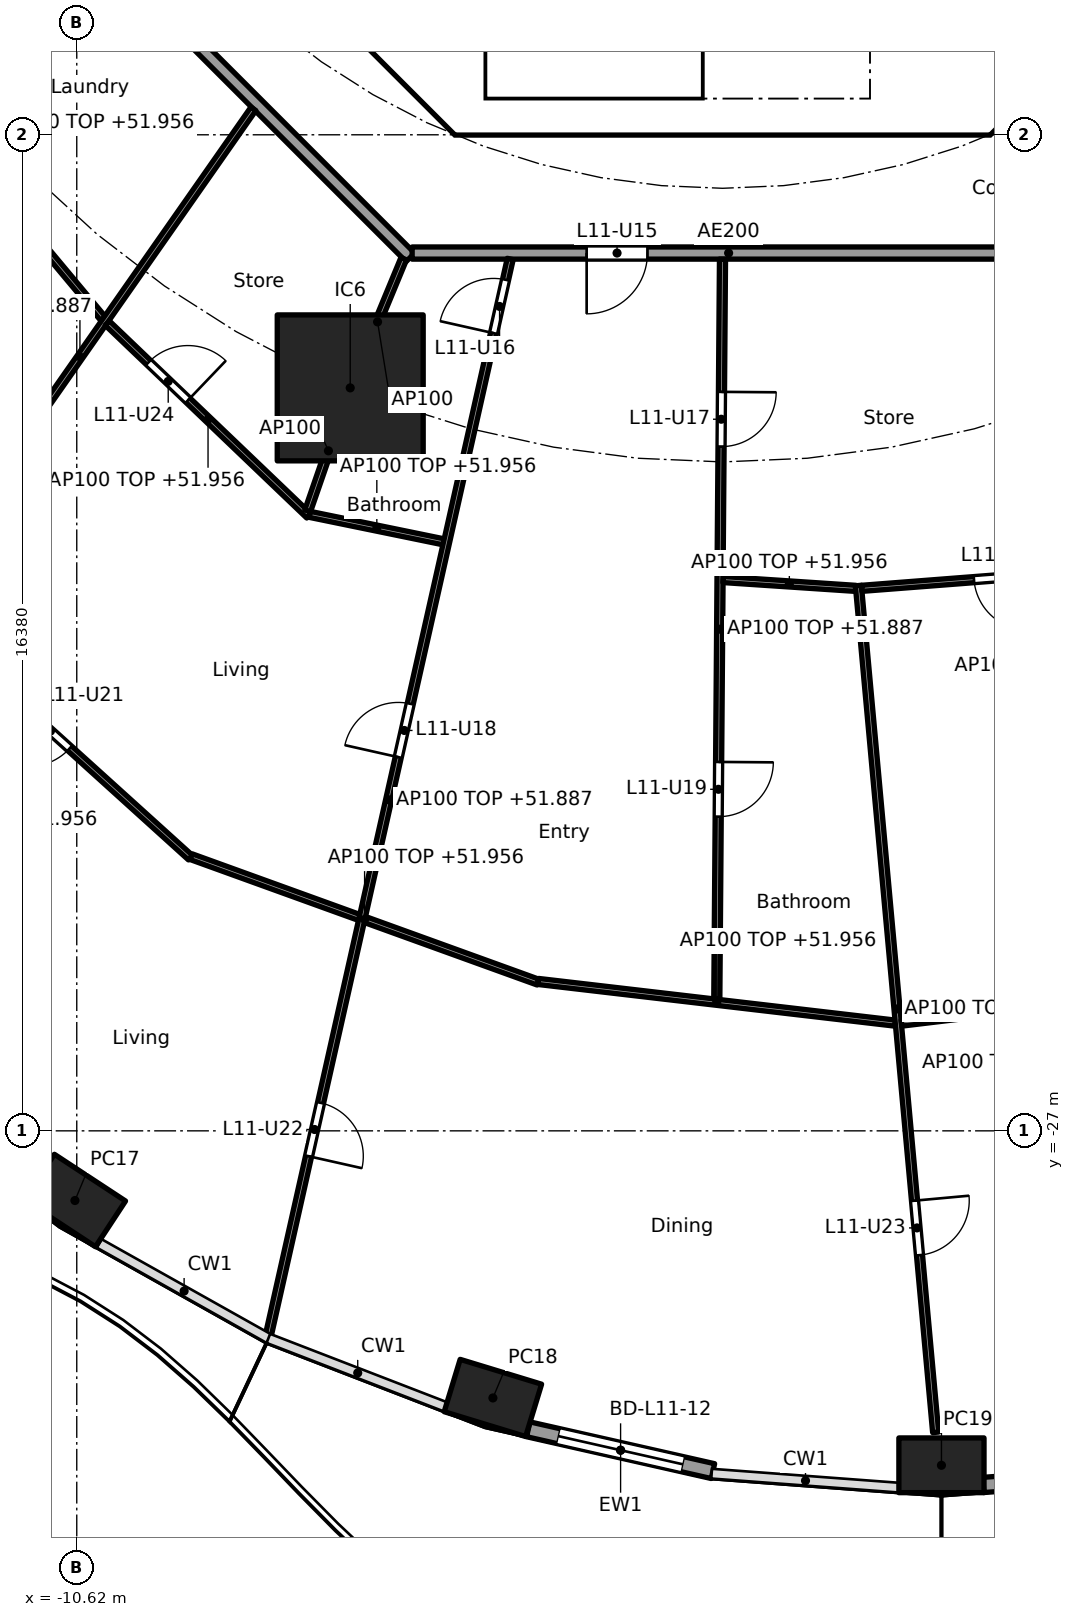
"""IFC4 building model, lengths in metres.
Left out: names, types, materials, properties, quantities, classifications, styles, units other than length and angle.
Written with IfcOpenShell. Run it as: python <this file> out.ifc"""

import sys

from ifc_helpers import new_model, si_unit, direction, frame, frame_2d, origin, origin_2d, place, context, subcontext, project, spatial, polyline, rectangle, hollow_rectangle, outline, extrude, element, fill, save


model = new_model("IFC4")
c1 = context("Model", 3, precision=1e-05, world=origin(), true_north=direction((0.0, 1.0)))
c2 = subcontext(c1, "Body", "Model", "MODEL_VIEW")
j1 = project(units=[si_unit("LENGTHUNIT", "METRE"), si_unit("PLANEANGLEUNIT", "RADIAN")], contexts=[c1])
p1 = place(None, origin())
s1 = spatial("IfcSite", under=j1, at=p1, CompositionType="ELEMENT")
p2 = place(p1, origin())
s2 = spatial("IfcBuilding", under=s1, at=p2, CompositionType="ELEMENT")
p3 = place(p2, frame((0.0, 0.0, 49.2)))
s3 = spatial("IfcBuildingStorey", under=s2, at=p3, CompositionType="ELEMENT", Elevation=49.2)
for number, where, z_axis, x_axis in (
    (1, (-10.65, -28.146, 0.0), (0.0, 0.0, 1.0), (0.836, -0.549, 0.0)),
    (2, (-3.776, -31.393, 0.0), (0.0, 0.0, 1.0), (0.957, -0.292, 0.0)),
    (3, (3.6, -32.5, 0.0), (0.0, 0.0, 1.0), (1.0, 0.0, 0.0)),
):
    element("IfcColumn", number, at=place(p3, frame(where, z_axis=z_axis, x_axis=x_axis)), inside=s3, PredefinedType="COLUMN", context=c2, shape_type="SweptSolid", body=[
        extrude(hollow_rectangle(XDim=1.4, YDim=0.9, WallThickness=0.05, at=origin_2d()), origin(), (0.0, 0.0, 1.0), 3.7),
    ])
p4 = place(p3, frame((-6.123, -14.782, 0.0), z_axis=(0.0, 0.0, 1.0), x_axis=(1.0, 0.0, 0.0)))
e4 = element("IfcColumn", 4, at=p4, inside=s3, PredefinedType="COLUMN", context=c2, shape_type="SweptSolid", body=[
    extrude(rectangle(XDim=2.4, YDim=2.4, at=origin_2d()), origin(), (0.0, 0.0, 1.0), 3.7),
])
p5 = place(p3, frame((-0.158, -32.596, 0.0), z_axis=(0.0, 0.0, 1.0), x_axis=(-0.975331134677, 0.220746863466, 0.0)))
e5 = element("IfcWall", 5, at=p5, inside=s3, PredefinedType="SOLIDWALL", context=c2, shape_type="SweptSolid", body=[
    extrude(rectangle(XDim=3.115, YDim=0.25, at=frame_2d((1.557, 0.0))), origin(), (0.0, 0.0, 1.0), 3.44),
])
p6 = place(p5, frame((0.507, 0.0, 0.0)))
e6 = element("IfcOpeningElement", 6, at=p6, cuts=e5, PredefinedType="OPENING", context=c2, shape_type="SweptSolid", body=[
    extrude(rectangle(XDim=2.1, YDim=2.4, at=frame_2d((1.05, 1.2))), frame((0.0, 0.135, 0.0), z_axis=(0.0, -1.0, 0.0), x_axis=(1.0, 0.0, 0.0)), (0.0, 0.0, 1.0), 0.27),
])
p7 = place(p3, frame((7.376, -32.593, 0.0), z_axis=(0.0, 0.0, 1.0), x_axis=(-0.997230834878, -0.074368420505, 0.0)))
e7 = element("IfcWall", 7, at=p7, inside=s3, PredefinedType="SOLIDWALL", context=c2, shape_type="SweptSolid", body=[
    extrude(rectangle(XDim=3.096, YDim=0.25, at=frame_2d((1.548, 0.0))), origin(), (0.0, 0.0, 1.0), 3.44),
])
p8 = place(p7, frame((0.498, 0.0, 0.0)))
e8 = element("IfcOpeningElement", 8, at=p8, cuts=e7, PredefinedType="OPENING", context=c2, shape_type="SweptSolid", body=[
    extrude(rectangle(XDim=2.1, YDim=2.4, at=frame_2d((1.05, 1.2))), frame((0.0, 0.135, 0.0), z_axis=(0.0, -1.0, 0.0), x_axis=(1.0, 0.0, 0.0)), (0.0, 0.0, 1.0), 0.27),
])
p9 = place(p3, frame((-9.988, -4.613, 0.0), z_axis=(0.0, 0.0, 1.0), x_axis=(0.707106781187, -0.707106781187, 0.0)))
e9 = element("IfcWall", 9, at=p9, inside=s3, PredefinedType="SHEAR", context=c2, shape_type="SweptSolid", body=[
    extrude(rectangle(XDim=7.602, YDim=0.6, at=frame_2d((3.801, 0.0))), origin(), (0.0, 0.0, 1.0), 3.44),
])
p10 = place(p9, frame((6.151, 0.0, 0.0)))
e10 = element("IfcOpeningElement", 10, at=p10, cuts=e9, PredefinedType="OPENING", context=c2, shape_type="SweptSolid", body=[
    extrude(rectangle(XDim=1.1, YDim=2.1, at=frame_2d((0.55, 1.05))), frame((0.0, 0.31, 0.0), z_axis=(0.0, -1.0, 0.0), x_axis=(1.0, 0.0, 0.0)), (0.0, 0.0, 1.0), 0.62),
])
p11 = place(p3, frame((4.613, -9.988, 0.0), z_axis=(0.0, 0.0, 1.0), x_axis=(0.707106781187, 0.707106781187, 0.0)))
e11 = element("IfcWall", 11, at=p11, inside=s3, PredefinedType="SHEAR", context=c2, shape_type="SweptSolid", body=[
    extrude(rectangle(XDim=7.602, YDim=0.6, at=frame_2d((3.801, 0.0))), origin(), (0.0, 0.0, 1.0), 3.44),
])
p12 = place(p11, frame((3.201, 0.0, 0.0)))
e12 = element("IfcOpeningElement", 12, at=p12, cuts=e11, PredefinedType="OPENING", context=c2, shape_type="SweptSolid", body=[
    extrude(rectangle(XDim=1.2, YDim=2.1, at=frame_2d((0.6, 1.05))), frame((0.0, 0.31, 0.0), z_axis=(0.0, -1.0, 0.0), x_axis=(1.0, 0.0, 0.0)), (0.0, 0.0, 1.0), 0.62),
])
p13 = place(p3, frame((4.0, -10.025, 0.0), z_axis=(0.0, 0.0, 1.0), x_axis=(0.0, 1.0, 0.0)))
e13 = element("IfcWall", 13, at=p13, inside=s3, PredefinedType="SOLIDWALL", context=c2, shape_type="SweptSolid", body=[
    extrude(rectangle(XDim=3.0, YDim=0.2, at=frame_2d((1.5, 0.0))), origin(), (0.0, 0.0, 1.0), 3.44),
])
p14 = place(p13, frame((0.975, 0.0, 0.0)))
e14 = element("IfcOpeningElement", 14, at=p14, cuts=e13, PredefinedType="OPENING", context=c2, shape_type="SweptSolid", body=[
    extrude(rectangle(XDim=1.1, YDim=2.1, at=frame_2d((0.55, 1.05))), frame((0.0, 0.11, 0.0), z_axis=(0.0, -1.0, 0.0), x_axis=(1.0, 0.0, 0.0)), (0.0, 0.0, 1.0), 0.22),
])
p15 = place(p3, origin())
e15 = element("IfcWall", 15, at=p15, inside=s3, PredefinedType="SHEAR", context=c2, shape_type="SweptSolid", body=[
    extrude(outline(polyline([(-4.152, -10.025), (4.152, -10.025), (4.401, -9.776), (4.825, -10.2), (4.401, -10.625), (-4.401, -10.625), (-4.825, -10.2), (-4.401, -9.776), (-4.152, -10.025)])), origin(), (0.0, 0.0, 1.0), 3.44),
])
p16 = place(p3, origin())
e16 = element("IfcWall", 16, at=p16, inside=s3, PredefinedType="SOLIDWALL", context=c2, shape_type="SweptSolid", body=[
    extrude(outline(polyline([(-3.9, -10.025), (-4.1, -10.025), (-4.1, -7.025), (-3.9, -7.025), (-3.9, -10.025)])), origin(), (0.0, 0.0, 1.0), 3.44),
])
p17 = place(p3, frame((-12.635, -5.134, 0.0), z_axis=(0.0, 0.0, 1.0), x_axis=(0.707106781187, -0.707106781187, 0.0)))
e17 = element("IfcWall", 17, at=p17, inside=s3, PredefinedType="PARTITIONING", context=c2, shape_type="SweptSolid", body=[
    extrude(rectangle(XDim=10.609, YDim=0.2, at=frame_2d((5.305, 0.0))), origin(), (0.0, 0.0, 1.0), 3.44),
])
p18 = place(p3, frame((-5.104, -12.565, 0.0), z_axis=(0.0, 0.0, 1.0), x_axis=(1.0, 0.0, 0.0)))
e18 = element("IfcWall", 18, at=p18, inside=s3, PredefinedType="PARTITIONING", context=c2, shape_type="SweptSolid", body=[
    extrude(rectangle(XDim=10.409, YDim=0.2, at=frame_2d((5.205, 0.0))), origin(), (0.0, 0.0, 1.0), 3.44),
])
p19 = place(p18, frame((2.87, 0.0, 0.0)))
e19 = element("IfcOpeningElement", 19, at=p19, cuts=e18, PredefinedType="OPENING", context=c2, shape_type="SweptSolid", body=[
    extrude(rectangle(XDim=1.0, YDim=2.1, at=frame_2d((0.5, 1.05))), frame((0.0, 0.11, 0.0), z_axis=(0.0, -1.0, 0.0), x_axis=(1.0, 0.0, 0.0)), (0.0, 0.0, 1.0), 0.22),
])
p20 = place(p3, frame((-13.222, -10.007, 0.0), z_axis=(0.0, 0.0, 1.0), x_axis=(0.640807748916, -0.767701393075, 0.0)))
e20 = element("IfcWall", 20, at=p20, inside=s3, PredefinedType="PARTITIONING", context=c2, shape_type="SweptSolid", body=[
    extrude(rectangle(XDim=4.737, YDim=0.1, at=frame_2d((2.368, 0.0))), origin(), (0.0, 0.0, 1.0), 2.756),
])
p21 = place(p20, frame((1.943, 0.0, 0.0)))
e21 = element("IfcOpeningElement", 21, at=p21, cuts=e20, PredefinedType="OPENING", context=c2, shape_type="SweptSolid", body=[
    extrude(rectangle(XDim=0.9, YDim=2.1, at=frame_2d((0.45, 1.05))), frame((0.0, 0.06, 0.0), z_axis=(0.0, -1.0, 0.0), x_axis=(1.0, 0.0, 0.0)), (0.0, 0.0, 1.0), 0.12),
])
p22 = place(p3, frame((-7.715, -10.193, 0.0), z_axis=(0.0, 0.0, 1.0), x_axis=(-0.573126502256, -0.819466907454, 0.0)))
e22 = element("IfcWall", 22, at=p22, inside=s3, PredefinedType="PARTITIONING", context=c2, shape_type="SweptSolid", body=[
    extrude(rectangle(XDim=9.954, YDim=0.1, at=frame_2d((4.977, 0.0))), origin(), (0.0, 0.0, 1.0), 2.687),
])
p23 = place(p3, frame((-10.119, -13.716, 0.0), z_axis=(0.0, 0.0, 1.0), x_axis=(0.722763212502, -0.69109575216, 0.0)))
e23 = element("IfcWall", 23, at=p23, inside=s3, PredefinedType="PARTITIONING", context=c2, shape_type="SweptSolid", body=[
    extrude(rectangle(XDim=4.587, YDim=0.1, at=frame_2d((2.293, 0.0))), origin(), (0.0, 0.0, 1.0), 2.756),
])
p24 = place(p23, frame((0.938, 0.0, 0.0)))
e24 = element("IfcOpeningElement", 24, at=p24, cuts=e23, PredefinedType="OPENING", context=c2, shape_type="SweptSolid", body=[
    extrude(rectangle(XDim=0.9, YDim=2.1, at=frame_2d((0.45, 1.05))), frame((0.0, 0.06, 0.0), z_axis=(0.0, -1.0, 0.0), x_axis=(1.0, 0.0, 0.0)), (0.0, 0.0, 1.0), 0.12),
])
p25 = place(p3, frame((-13.355, -18.343, 0.0), z_axis=(0.0, 0.0, 1.0), x_axis=(0.741720189244, -0.670709445936, 0.0)))
e25 = element("IfcWall", 25, at=p25, inside=s3, PredefinedType="PARTITIONING", context=c2, shape_type="SweptSolid", body=[
    extrude(rectangle(XDim=6.209, YDim=0.1, at=frame_2d((3.104, 0.0))), origin(), (0.0, 0.0, 1.0), 2.756),
])
p26 = place(p25, frame((2.63, 0.0, 0.0)))
e26 = element("IfcOpeningElement", 26, at=p26, cuts=e25, PredefinedType="OPENING", context=c2, shape_type="SweptSolid", body=[
    extrude(rectangle(XDim=0.9, YDim=2.1, at=frame_2d((0.45, 1.05))), frame((0.0, 0.06, 0.0), z_axis=(0.0, -1.0, 0.0), x_axis=(1.0, 0.0, 0.0)), (0.0, 0.0, 1.0), 0.12),
])
p27 = place(p3, frame((-5.243, -12.657, 0.0), z_axis=(0.0, 0.0, 1.0), x_axis=(-0.382719158442, -0.923864733477, 0.0)))
e27 = element("IfcWall", 27, at=p27, inside=s3, PredefinedType="PARTITIONING", context=c2, shape_type="SweptSolid", body=[
    extrude(rectangle(XDim=2.25, YDim=0.1, at=frame_2d((1.125, 0.0))), origin(), (0.0, 0.0, 1.0), 3.44),
])
p28 = place(p3, frame((-6.139, -14.83, 0.0), z_axis=(0.0, 0.0, 1.0), x_axis=(-0.327246993321, -0.944938836837, 0.0)))
e28 = element("IfcWall", 28, at=p28, inside=s3, PredefinedType="PARTITIONING", context=c2, shape_type="SweptSolid", body=[
    extrude(rectangle(XDim=2.09, YDim=0.1, at=frame_2d((1.045, 0.0))), origin(), (0.0, 0.0, 1.0), 3.44),
])
p29 = place(p3, frame((-6.791, -16.862, 0.0), z_axis=(0.0, 0.0, 1.0), x_axis=(0.979581941859, -0.201045316246, 0.0)))
e29 = element("IfcWall", 29, at=p29, inside=s3, PredefinedType="PARTITIONING", context=c2, shape_type="SweptSolid", body=[
    extrude(rectangle(XDim=2.256, YDim=0.1, at=frame_2d((1.128, 0.0))), origin(), (0.0, 0.0, 1.0), 2.756),
])
p30 = place(p3, frame((-8.739, -22.491, 0.0), z_axis=(0.0, 0.0, 1.0), x_axis=(0.940401691072, -0.340065669288, 0.0)))
e30 = element("IfcWall", 30, at=p30, inside=s3, PredefinedType="PARTITIONING", context=c2, shape_type="SweptSolid", body=[
    extrude(rectangle(XDim=6.067, YDim=0.1, at=frame_2d((3.034, 0.0))), origin(), (0.0, 0.0, 1.0), 2.756),
])
p31 = place(p3, frame((-3.492, -12.662, 0.0), z_axis=(0.0, 0.0, 1.0), x_axis=(-0.219268088006, -0.975664648115, 0.0)))
e31 = element("IfcWall", 31, at=p31, inside=s3, PredefinedType="PARTITIONING", context=c2, shape_type="SweptSolid", body=[
    extrude(rectangle(XDim=18.23, YDim=0.1, at=frame_2d((9.115, 0.0))), origin(), (0.0, 0.0, 1.0), 2.687),
])
p32 = place(p31, frame((0.35, 0.0, 0.0)))
e32 = element("IfcOpeningElement", 32, at=p32, cuts=e31, PredefinedType="OPENING", context=c2, shape_type="SweptSolid", body=[
    extrude(rectangle(XDim=0.9, YDim=2.1, at=frame_2d((0.45, 1.05))), frame((0.0, 0.06, 0.0), z_axis=(0.0, -1.0, 0.0), x_axis=(1.0, 0.0, 0.0)), (0.0, 0.0, 1.0), 0.12),
])
p33 = place(p31, frame((7.497, 0.0, 0.0)))
e33 = element("IfcOpeningElement", 33, at=p33, cuts=e31, PredefinedType="OPENING", context=c2, shape_type="SweptSolid", body=[
    extrude(rectangle(XDim=0.9, YDim=2.1, at=frame_2d((0.45, 1.05))), frame((0.0, 0.06, 0.0), z_axis=(0.0, -1.0, 0.0), x_axis=(1.0, 0.0, 0.0)), (0.0, 0.0, 1.0), 0.12),
])
p34 = place(p31, frame((14.223, 0.0, 0.0)))
e34 = element("IfcOpeningElement", 34, at=p34, cuts=e31, PredefinedType="OPENING", context=c2, shape_type="SweptSolid", body=[
    extrude(rectangle(XDim=0.9, YDim=2.1, at=frame_2d((0.45, 1.05))), frame((0.0, 0.06, 0.0), z_axis=(0.0, -1.0, 0.0), x_axis=(1.0, 0.0, 0.0)), (0.0, 0.0, 1.0), 0.12),
])
p35 = place(p3, frame((-3.031, -24.543, 0.0), z_axis=(0.0, 0.0, 1.0), x_axis=(0.993255612046, -0.115945198862, 0.0)))
e35 = element("IfcWall", 35, at=p35, inside=s3, PredefinedType="PARTITIONING", context=c2, shape_type="SweptSolid", body=[
    extrude(rectangle(XDim=5.913, YDim=0.1, at=frame_2d((2.956, 0.0))), origin(), (0.0, 0.0, 1.0), 2.756),
])
p36 = place(p3, frame((-0.001, -12.665, 0.0), z_axis=(0.0, 0.0, 1.0), x_axis=(-0.007702417287, -0.999970335944, 0.0)))
e36 = element("IfcWall", 36, at=p36, inside=s3, PredefinedType="PARTITIONING", context=c2, shape_type="SweptSolid", body=[
    extrude(rectangle(XDim=12.171, YDim=0.1, at=frame_2d((6.086, 0.0))), origin(), (0.0, 0.0, 1.0), 2.687),
])
p37 = place(p36, frame((2.183, 0.0, 0.0)))
e37 = element("IfcOpeningElement", 37, at=p37, cuts=e36, PredefinedType="OPENING", context=c2, shape_type="SweptSolid", body=[
    extrude(rectangle(XDim=0.9, YDim=2.1, at=frame_2d((0.45, 1.05))), frame((0.0, 0.06, 0.0), z_axis=(0.0, -1.0, 0.0), x_axis=(1.0, 0.0, 0.0)), (0.0, 0.0, 1.0), 0.12),
])
p38 = place(p36, frame((8.269, 0.0, 0.0)))
e38 = element("IfcOpeningElement", 38, at=p38, cuts=e36, PredefinedType="OPENING", context=c2, shape_type="SweptSolid", body=[
    extrude(rectangle(XDim=0.9, YDim=2.1, at=frame_2d((0.45, 1.05))), frame((0.0, 0.06, 0.0), z_axis=(0.0, -1.0, 0.0), x_axis=(1.0, 0.0, 0.0)), (0.0, 0.0, 1.0), 0.12),
])
p39 = place(p3, frame((0.009, -17.934, 0.0), z_axis=(0.0, 0.0, 1.0), x_axis=(0.997794542617, -0.066378089183, 0.0)))
e39 = element("IfcWall", 39, at=p39, inside=s3, PredefinedType="PARTITIONING", context=c2, shape_type="SweptSolid", body=[
    extrude(rectangle(XDim=2.185, YDim=0.1, at=frame_2d((1.092, 0.0))), origin(), (0.0, 0.0, 1.0), 2.756),
])
p40 = place(p3, frame((2.234, -18.032, 0.0), z_axis=(0.0, 0.0, 1.0), x_axis=(0.090891502968, -0.995860800859, 0.0)))
e40 = element("IfcWall", 40, at=p40, inside=s3, PredefinedType="PARTITIONING", context=c2, shape_type="SweptSolid", body=[
    extrude(rectangle(XDim=13.984, YDim=0.1, at=frame_2d((6.992, 0.0))), origin(), (0.0, 0.0, 1.0), 2.756),
])
p41 = place(p40, frame((10.158, 0.0, 0.0)))
e41 = element("IfcOpeningElement", 41, at=p41, cuts=e40, PredefinedType="OPENING", context=c2, shape_type="SweptSolid", body=[
    extrude(rectangle(XDim=0.9, YDim=2.1, at=frame_2d((0.45, 1.05))), frame((0.0, 0.06, 0.0), z_axis=(0.0, -1.0, 0.0), x_axis=(1.0, 0.0, 0.0)), (0.0, 0.0, 1.0), 0.12),
])
p42 = place(p3, frame((2.288, -18.078, 0.0), z_axis=(0.0, 0.0, 1.0), x_axis=(0.99701850123, 0.077162868047, 0.0)))
e42 = element("IfcWall", 42, at=p42, inside=s3, PredefinedType="PARTITIONING", context=c2, shape_type="SweptSolid", body=[
    extrude(rectangle(XDim=4.604, YDim=0.1, at=frame_2d((2.302, 0.0))), origin(), (0.0, 0.0, 1.0), 2.756),
])
p43 = place(p42, frame((1.852, 0.0, 0.0)))
e43 = element("IfcOpeningElement", 43, at=p43, cuts=e42, PredefinedType="OPENING", context=c2, shape_type="SweptSolid", body=[
    extrude(rectangle(XDim=0.9, YDim=2.1, at=frame_2d((0.45, 1.05))), frame((0.0, 0.06, 0.0), z_axis=(0.0, -1.0, 0.0), x_axis=(1.0, 0.0, 0.0)), (0.0, 0.0, 1.0), 0.12),
])
p44 = place(p3, frame((2.941, -25.229, 0.0), z_axis=(0.0, 0.0, 1.0), x_axis=(0.992834127896, 0.119500604542, 0.0)))
e44 = element("IfcWall", 44, at=p44, inside=s3, PredefinedType="PARTITIONING", context=c2, shape_type="SweptSolid", body=[
    extrude(rectangle(XDim=5.959, YDim=0.1, at=frame_2d((2.98, 0.0))), origin(), (0.0, 0.0, 1.0), 2.756),
])
p45 = place(p6, origin())
e45 = element("IfcDoor", 45, at=p45, inside=s3, OperationType="SLIDING_TO_LEFT", PredefinedType="DOOR", context=c2, shape_type="SweptSolid", body=[
    extrude(rectangle(XDim=2.1, YDim=2.4, at=frame_2d((1.05, 1.2))), frame((0.0, 0.025, 0.0), z_axis=(0.0, -1.0, 0.0), x_axis=(1.0, 0.0, 0.0)), (0.0, 0.0, 1.0), 0.05),
])
fill(e6, e45)
p46 = place(p10, origin())
e46 = element("IfcDoor", 46, at=p46, inside=s3, OperationType="SINGLE_SWING_RIGHT", PredefinedType="DOOR", context=c2, shape_type="SweptSolid", body=[
    extrude(rectangle(XDim=1.1, YDim=2.1, at=frame_2d((0.55, 1.05))), frame((0.0, 0.025, 0.0), z_axis=(0.0, -1.0, 0.0), x_axis=(1.0, 0.0, 0.0)), (0.0, 0.0, 1.0), 0.05),
])
fill(e10, e46)
p47 = place(p19, frame((1.0, 0.0, 0.0), x_axis=(-1.0, 0.0, 0.0)))
e47 = element("IfcDoor", 47, at=p47, inside=s3, OperationType="SINGLE_SWING_RIGHT", PredefinedType="DOOR", context=c2, shape_type="SweptSolid", body=[
    extrude(rectangle(XDim=1.0, YDim=2.1, at=frame_2d((0.5, 1.05))), frame((0.0, 0.025, 0.0), z_axis=(0.0, -1.0, 0.0), x_axis=(1.0, 0.0, 0.0)), (0.0, 0.0, 1.0), 0.05),
])
fill(e19, e47)
p48 = place(p32, frame((0.9, 0.0, 0.0), x_axis=(-1.0, 0.0, 0.0)))
e48 = element("IfcDoor", 48, at=p48, inside=s3, OperationType="SINGLE_SWING_LEFT", PredefinedType="DOOR", context=c2, shape_type="SweptSolid", body=[
    extrude(rectangle(XDim=0.9, YDim=2.1, at=frame_2d((0.45, 1.05))), frame((0.0, 0.025, 0.0), z_axis=(0.0, -1.0, 0.0), x_axis=(1.0, 0.0, 0.0)), (0.0, 0.0, 1.0), 0.05),
])
fill(e32, e48)
p49 = place(p37, origin())
e49 = element("IfcDoor", 49, at=p49, inside=s3, OperationType="SINGLE_SWING_LEFT", PredefinedType="DOOR", context=c2, shape_type="SweptSolid", body=[
    extrude(rectangle(XDim=0.9, YDim=2.1, at=frame_2d((0.45, 1.05))), frame((0.0, 0.025, 0.0), z_axis=(0.0, -1.0, 0.0), x_axis=(1.0, 0.0, 0.0)), (0.0, 0.0, 1.0), 0.05),
])
fill(e37, e49)
p50 = place(p33, frame((0.9, 0.0, 0.0), x_axis=(-1.0, 0.0, 0.0)))
e50 = element("IfcDoor", 50, at=p50, inside=s3, OperationType="SINGLE_SWING_LEFT", PredefinedType="DOOR", context=c2, shape_type="SweptSolid", body=[
    extrude(rectangle(XDim=0.9, YDim=2.1, at=frame_2d((0.45, 1.05))), frame((0.0, 0.025, 0.0), z_axis=(0.0, -1.0, 0.0), x_axis=(1.0, 0.0, 0.0)), (0.0, 0.0, 1.0), 0.05),
])
fill(e33, e50)
p51 = place(p38, origin())
e51 = element("IfcDoor", 51, at=p51, inside=s3, OperationType="SINGLE_SWING_LEFT", PredefinedType="DOOR", context=c2, shape_type="SweptSolid", body=[
    extrude(rectangle(XDim=0.9, YDim=2.1, at=frame_2d((0.45, 1.05))), frame((0.0, 0.025, 0.0), z_axis=(0.0, -1.0, 0.0), x_axis=(1.0, 0.0, 0.0)), (0.0, 0.0, 1.0), 0.05),
])
fill(e38, e51)
p52 = place(p43, frame((0.9, 0.0, 0.0), x_axis=(-1.0, 0.0, 0.0)))
e52 = element("IfcDoor", 52, at=p52, inside=s3, OperationType="SINGLE_SWING_LEFT", PredefinedType="DOOR", context=c2, shape_type="SweptSolid", body=[
    extrude(rectangle(XDim=0.9, YDim=2.1, at=frame_2d((0.45, 1.05))), frame((0.0, 0.025, 0.0), z_axis=(0.0, -1.0, 0.0), x_axis=(1.0, 0.0, 0.0)), (0.0, 0.0, 1.0), 0.05),
])
fill(e43, e52)
p53 = place(p26, frame((0.9, 0.0, 0.0), x_axis=(-1.0, 0.0, 0.0)))
e53 = element("IfcDoor", 53, at=p53, inside=s3, OperationType="SINGLE_SWING_RIGHT", PredefinedType="DOOR", context=c2, shape_type="SweptSolid", body=[
    extrude(rectangle(XDim=0.9, YDim=2.1, at=frame_2d((0.45, 1.05))), frame((0.0, 0.025, 0.0), z_axis=(0.0, -1.0, 0.0), x_axis=(1.0, 0.0, 0.0)), (0.0, 0.0, 1.0), 0.05),
])
fill(e26, e53)
p54 = place(p34, origin())
e54 = element("IfcDoor", 54, at=p54, inside=s3, OperationType="SINGLE_SWING_RIGHT", PredefinedType="DOOR", context=c2, shape_type="SweptSolid", body=[
    extrude(rectangle(XDim=0.9, YDim=2.1, at=frame_2d((0.45, 1.05))), frame((0.0, 0.025, 0.0), z_axis=(0.0, -1.0, 0.0), x_axis=(1.0, 0.0, 0.0)), (0.0, 0.0, 1.0), 0.05),
])
fill(e34, e54)
p55 = place(p41, origin())
e55 = element("IfcDoor", 55, at=p55, inside=s3, OperationType="SINGLE_SWING_LEFT", PredefinedType="DOOR", context=c2, shape_type="SweptSolid", body=[
    extrude(rectangle(XDim=0.9, YDim=2.1, at=frame_2d((0.45, 1.05))), frame((0.0, 0.025, 0.0), z_axis=(0.0, -1.0, 0.0), x_axis=(1.0, 0.0, 0.0)), (0.0, 0.0, 1.0), 0.05),
])
fill(e41, e55)
p56 = place(p24, origin())
e56 = element("IfcDoor", 56, at=p56, inside=s3, OperationType="SINGLE_SWING_RIGHT", PredefinedType="DOOR", context=c2, shape_type="SweptSolid", body=[
    extrude(rectangle(XDim=0.9, YDim=2.1, at=frame_2d((0.45, 1.05))), frame((0.0, 0.025, 0.0), z_axis=(0.0, -1.0, 0.0), x_axis=(1.0, 0.0, 0.0)), (0.0, 0.0, 1.0), 0.05),
])
fill(e24, e56)
save(model, sys.argv[1])
